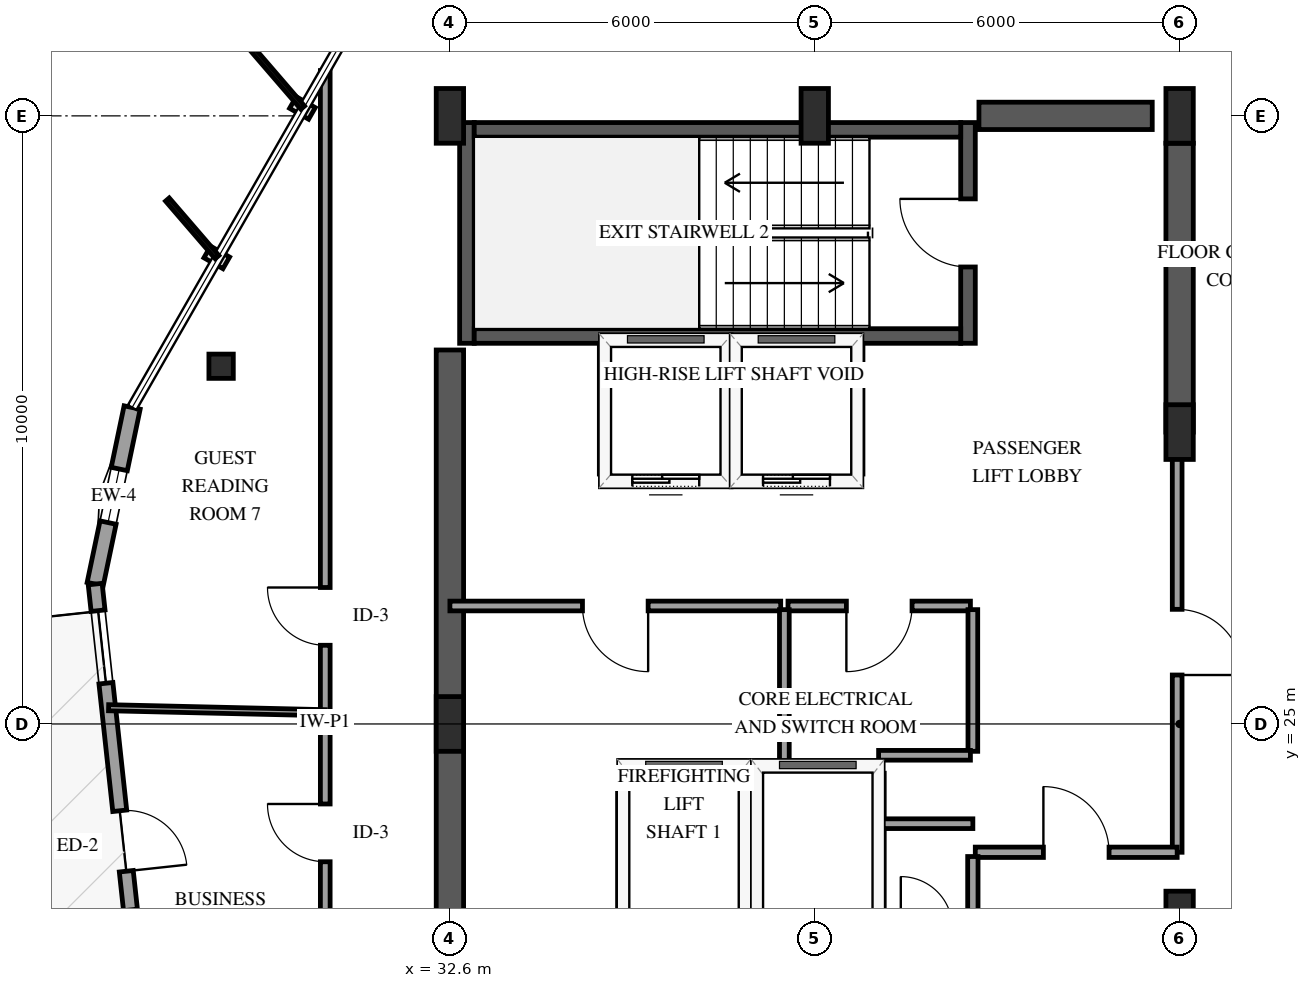
"""IFC4 building model, lengths in metres.
Left out: names, types, materials, properties, quantities, classifications, styles, units other than length and angle.
Written with IfcOpenShell. Run it as: python <this file> out.ifc"""

import sys

from ifc_helpers import new_model, si_unit, direction, frame, frame_2d, origin, origin_2d, place, context, subcontext, project, spatial, rectangle, i_section, extrude, element, fill, save


model = new_model("IFC4")
c1 = context("Model", 3, precision=1e-05, world=origin(), true_north=direction((0.0, 1.0)))
c2 = subcontext(c1, "Body", "Model", "MODEL_VIEW")
j1 = project(units=[si_unit("LENGTHUNIT", "METRE"), si_unit("PLANEANGLEUNIT", "RADIAN")], contexts=[c1])
p1 = place(None, origin())
s1 = spatial("IfcSite", under=j1, at=p1, CompositionType="ELEMENT")
p2 = place(p1, origin())
s2 = spatial("IfcBuilding", under=s1, at=p2, CompositionType="ELEMENT")
p3 = place(p2, frame((0.0, 0.0, 253.75)))
s3 = spatial("IfcBuildingStorey", under=s2, at=p3, CompositionType="ELEMENT", Elevation=253.75)
p4 = place(p3, frame((32.88, 31.26, 0.0), z_axis=(0.0, 0.0, 1.0), x_axis=(0.0, 1.0, 0.0)))
e1 = element("IfcWall", 1, at=p4, inside=s3, PredefinedType="SHEAR", context=c2, shape_type="SweptSolid", body=[
    extrude(rectangle(XDim=3.63, YDim=0.24, at=frame_2d((1.815, 0.0))), origin(), (0.0, 0.0, 1.0), 3.75),
])
p5 = place(p3, frame((41.12, 31.26, 0.0), z_axis=(0.0, 0.0, 1.0), x_axis=(0.0, 1.0, 0.0)))
e2 = element("IfcWall", 2, at=p5, inside=s3, PredefinedType="SHEAR", context=c2, shape_type="SweptSolid", body=[
    extrude(rectangle(XDim=3.63, YDim=0.24, at=frame_2d((1.815, 0.0))), origin(), (0.0, 0.0, 1.0), 3.75),
])
p6 = place(p5, frame((1.255, 0.0, 0.0)))
e3 = element("IfcOpeningElement", 3, at=p6, cuts=e2, PredefinedType="OPENING", context=c2, shape_type="SweptSolid", body=[
    extrude(rectangle(XDim=1.12, YDim=2.15, at=frame_2d((0.56, 1.075))), frame((0.0, 0.13, 0.0), z_axis=(0.0, -1.0, 0.0), x_axis=(1.0, 0.0, 0.0)), (0.0, 0.0, 1.0), 0.26),
])
for number, where, z_axis, x_axis in (
    (4, (33.0, 31.38, 0.0), (0.0, 0.0, 1.0), (1.0, 0.0, 0.0)),
    (5, (33.0, 34.77, 0.0), (0.0, 0.0, 1.0), (1.0, 0.0, 0.0)),
):
    element("IfcWall", number, at=place(p3, frame(where, z_axis=z_axis, x_axis=x_axis)), inside=s3, PredefinedType="SHEAR", context=c2, shape_type="SweptSolid", body=[
        extrude(rectangle(XDim=8.0, YDim=0.24, at=frame_2d((4.0, 0.0))), origin(), (0.0, 0.0, 1.0), 3.75),
    ])
p7 = place(p3, frame((32.6, 18.85, 0.0), z_axis=(0.0, 0.0, 1.0), x_axis=(0.0, 1.0, 0.0)))
e6 = element("IfcWall", 6, at=p7, inside=s3, PredefinedType="SHEAR", context=c2, shape_type="SweptSolid", body=[
    extrude(rectangle(XDim=12.3, YDim=0.45, at=frame_2d((6.15, 0.0))), origin(), (0.0, 0.0, 1.0), 3.75),
])
p8 = place(p3, frame((41.3, 35.0, 0.0), z_axis=(0.0, 0.0, 1.0), x_axis=(1.0, 0.0, 0.0)))
e7 = element("IfcWall", 7, at=p8, inside=s3, PredefinedType="SHEAR", context=c2, shape_type="SweptSolid", body=[
    extrude(rectangle(XDim=2.85, YDim=0.45, at=frame_2d((1.425, 0.0))), origin(), (0.0, 0.0, 1.0), 3.75),
])
p9 = place(p3, frame((44.6, 29.8, 0.0), z_axis=(0.0, 0.0, 1.0), x_axis=(0.0, 1.0, 0.0)))
e8 = element("IfcWall", 8, at=p9, inside=s3, PredefinedType="SHEAR", context=c2, shape_type="SweptSolid", body=[
    extrude(rectangle(XDim=4.75, YDim=0.45, at=frame_2d((2.375, 0.0))), origin(), (0.0, 0.0, 1.0), 3.75),
])
for number, where, z_axis, x_axis in (
    (9, (32.6, 25.0, 0.0), (0.0, 0.0, 1.0), (1.0, 0.0, 0.0)),
    (10, (32.6, 35.0, 0.0), (0.0, 0.0, 1.0), (1.0, 0.0, 0.0)),
    (11, (38.6, 35.0, 0.0), (0.0, 0.0, 1.0), (1.0, 0.0, 0.0)),
    (12, (44.6, 21.8, 0.0), (0.0, 0.0, 1.0), (1.0, 0.0, 0.0)),
    (13, (44.6, 29.8, 0.0), (0.0, 0.0, 1.0), (1.0, 0.0, 0.0)),
    (14, (44.6, 35.0, 0.0), (0.0, 0.0, 1.0), (1.0, 0.0, 0.0)),
):
    element("IfcColumn", number, at=place(p3, frame(where, z_axis=z_axis, x_axis=x_axis)), inside=s3, PredefinedType="PILASTER", context=c2, shape_type="SweptSolid", body=[
        extrude(rectangle(XDim=0.45, YDim=0.9, at=origin_2d()), origin(), (0.0, 0.0, 1.0), 3.75),
    ])
p10 = place(p3, frame((28.837, 30.883, 0.0), z_axis=(0.0, 0.0, 1.0), x_axis=(1.0, 0.0, 0.0)))
e15 = element("IfcColumn", 15, at=p10, inside=s3, PredefinedType="COLUMN", context=c2, shape_type="SweptSolid", body=[
    extrude(i_section(OverallWidth=0.401, OverallDepth=0.399, WebThickness=0.025, FlangeThickness=0.04, FilletRadius=0.038, at=origin_2d()), origin(), (0.0, 0.0, 1.0), 3.75),
])
p11 = place(p3, frame((27.374, 30.204, 0.0), z_axis=(0.0, 0.0, 1.0), x_axis=(-0.204828317867, -0.978797915915, 0.0)))
e16 = element("IfcWall", 16, at=p11, inside=s3, PredefinedType="SOLIDWALL", context=c2, shape_type="SweptSolid", body=[
    extrude(rectangle(XDim=2.967, YDim=0.27, at=frame_2d((1.483, 0.0))), origin(), (0.0, 0.0, 1.0), 2.829),
])
p12 = place(p11, frame((1.033, 0.0, 0.75)))
e17 = element("IfcOpeningElement", 17, at=p12, cuts=e16, PredefinedType="OPENING", context=c2, shape_type="SweptSolid", body=[
    extrude(rectangle(XDim=0.9, YDim=1.5, at=frame_2d((0.45, 0.75))), frame((0.0, 0.145, 0.0), z_axis=(0.0, -1.0, 0.0), x_axis=(1.0, 0.0, 0.0)), (0.0, 0.0, 1.0), 0.29),
])
p13 = place(p3, frame((26.767, 27.3, 0.0), z_axis=(0.0, 0.0, 1.0), x_axis=(0.107656797247, -0.994188118017, 0.0)))
e18 = element("IfcWall", 18, at=p13, inside=s3, PredefinedType="SOLIDWALL", context=c2, shape_type="SweptSolid", body=[
    extrude(rectangle(XDim=8.5, YDim=0.23, at=frame_2d((4.25, 0.0))), origin(), (0.0, 0.0, 1.0), 2.829),
])
p14 = place(p13, frame((3.75, 0.0, 0.0)))
e19 = element("IfcOpeningElement", 19, at=p14, cuts=e18, PredefinedType="OPENING", context=c2, shape_type="SweptSolid", body=[
    extrude(rectangle(XDim=1.0, YDim=2.15, at=frame_2d((0.5, 1.075))), frame((0.0, 0.125, 0.0), z_axis=(0.0, -1.0, 0.0), x_axis=(1.0, 0.0, 0.0)), (0.0, 0.0, 1.0), 0.25),
])
p15 = place(p13, frame((0.44, 0.0, 0.72)))
e20 = element("IfcOpeningElement", 20, at=p15, cuts=e18, PredefinedType="OPENING", context=c2, shape_type="SweptSolid", body=[
    extrude(rectangle(XDim=1.2, YDim=1.6, at=frame_2d((0.6, 0.8))), frame((0.0, 0.125, 0.0), z_axis=(0.0, -1.0, 0.0), x_axis=(1.0, 0.0, 0.0)), (0.0, 0.0, 1.0), 0.25),
])
p16 = place(p13, frame((5.39, 0.0, 0.72)))
e21 = element("IfcOpeningElement", 21, at=p16, cuts=e18, PredefinedType="OPENING", context=c2, shape_type="SweptSolid", body=[
    extrude(rectangle(XDim=1.2, YDim=1.6, at=frame_2d((0.6, 0.8))), frame((0.0, 0.125, 0.0), z_axis=(0.0, -1.0, 0.0), x_axis=(1.0, 0.0, 0.0)), (0.0, 0.0, 1.0), 0.25),
])
p17 = place(p3, frame((35.45, 24.3, 0.0), z_axis=(0.0, 0.0, 1.0), x_axis=(1.0, 0.0, 0.0)))
e22 = element("IfcWall", 22, at=p17, inside=s3, PredefinedType="SOLIDWALL", context=c2, shape_type="SweptSolid", body=[
    extrude(rectangle(XDim=2.0, YDim=0.185, at=frame_2d((1.0, 0.0))), origin(), (0.0, 0.0, 1.0), 2.824),
])
for number, where, z_axis, x_axis in (
    (23, (35.45, 21.81, 0.0), (0.0, 0.0, 1.0), (0.0, 1.0, 0.0)),
    (24, (37.45, 21.81, 0.0), (0.0, 0.0, 1.0), (0.0, 1.0, 0.0)),
):
    element("IfcWall", number, at=place(p3, frame(where, z_axis=z_axis, x_axis=x_axis)), inside=s3, PredefinedType="SOLIDWALL", context=c2, shape_type="SweptSolid", body=[
        extrude(rectangle(XDim=2.38, YDim=0.185, at=frame_2d((1.19, 0.0))), origin(), (0.0, 0.0, 1.0), 3.45),
    ])
p18 = place(p3, frame((37.65, 24.3, 0.0), z_axis=(0.0, 0.0, 1.0), x_axis=(1.0, 0.0, 0.0)))
e25 = element("IfcWall", 25, at=p18, inside=s3, PredefinedType="SOLIDWALL", context=c2, shape_type="SweptSolid", body=[
    extrude(rectangle(XDim=2.0, YDim=0.185, at=frame_2d((1.0, 0.0))), origin(), (0.0, 0.0, 1.0), 2.824),
])
p19 = place(p3, frame((39.65, 21.81, 0.0), z_axis=(0.0, 0.0, 1.0), x_axis=(0.0, 1.0, 0.0)))
e26 = element("IfcWall", 26, at=p19, inside=s3, PredefinedType="SOLIDWALL", context=c2, shape_type="SweptSolid", body=[
    extrude(rectangle(XDim=2.38, YDim=0.185, at=frame_2d((1.19, 0.0))), origin(), (0.0, 0.0, 1.0), 3.45),
])
p20 = place(p3, frame((35.15, 29.0, 0.0), z_axis=(0.0, 0.0, 1.0), x_axis=(1.0, 0.0, 0.0)))
e27 = element("IfcWall", 27, at=p20, inside=s3, PredefinedType="SOLIDWALL", context=c2, shape_type="SweptSolid", body=[
    extrude(rectangle(XDim=2.0, YDim=0.185, at=frame_2d((1.0, 0.0))), origin(), (0.0, 0.0, 1.0), 3.45),
])
p21 = place(p20, frame((0.45, 0.0, 0.0)))
e28 = element("IfcOpeningElement", 28, at=p21, cuts=e27, PredefinedType="OPENING", context=c2, shape_type="SweptSolid", body=[
    extrude(rectangle(XDim=1.1, YDim=2.15, at=frame_2d((0.55, 1.075))), frame((0.0, 0.103, 0.0), z_axis=(0.0, -1.0, 0.0), x_axis=(1.0, 0.0, 0.0)), (0.0, 0.0, 1.0), 0.205),
])
for number, where, z_axis, x_axis in (
    (29, (35.15, 29.11, 0.0), (0.0, 0.0, 1.0), (0.0, 1.0, 0.0)),
    (30, (37.15, 29.11, 0.0), (0.0, 0.0, 1.0), (0.0, 1.0, 0.0)),
):
    element("IfcWall", number, at=place(p3, frame(where, z_axis=z_axis, x_axis=x_axis)), inside=s3, PredefinedType="SOLIDWALL", context=c2, shape_type="SweptSolid", body=[
        extrude(rectangle(XDim=2.1, YDim=0.185, at=frame_2d((1.05, 0.0))), origin(), (0.0, 0.0, 1.0), 3.45),
    ])
p22 = place(p3, frame((37.3, 29.0, 0.0), z_axis=(0.0, 0.0, 1.0), x_axis=(1.0, 0.0, 0.0)))
e31 = element("IfcWall", 31, at=p22, inside=s3, PredefinedType="SOLIDWALL", context=c2, shape_type="SweptSolid", body=[
    extrude(rectangle(XDim=2.0, YDim=0.185, at=frame_2d((1.0, 0.0))), origin(), (0.0, 0.0, 1.0), 3.45),
])
p23 = place(p22, frame((0.45, 0.0, 0.0)))
e32 = element("IfcOpeningElement", 32, at=p23, cuts=e31, PredefinedType="OPENING", context=c2, shape_type="SweptSolid", body=[
    extrude(rectangle(XDim=1.1, YDim=2.15, at=frame_2d((0.55, 1.075))), frame((0.0, 0.103, 0.0), z_axis=(0.0, -1.0, 0.0), x_axis=(1.0, 0.0, 0.0)), (0.0, 0.0, 1.0), 0.205),
])
p24 = place(p3, frame((39.3, 29.11, 0.0), z_axis=(0.0, 0.0, 1.0), x_axis=(0.0, 1.0, 0.0)))
e33 = element("IfcWall", 33, at=p24, inside=s3, PredefinedType="SOLIDWALL", context=c2, shape_type="SweptSolid", body=[
    extrude(rectangle(XDim=2.1, YDim=0.185, at=frame_2d((1.05, 0.0))), origin(), (0.0, 0.0, 1.0), 3.45),
])
p25 = place(p3, frame((30.55, 25.185, 0.0), z_axis=(0.0, 0.0, 1.0), x_axis=(0.0, 1.0, 0.0)))
e34 = element("IfcWall", 34, at=p25, inside=s3, PredefinedType="PARTITIONING", context=c2, shape_type="SweptSolid", body=[
    extrude(rectangle(XDim=10.56, YDim=0.16, at=frame_2d((5.28, 0.0))), origin(), (0.0, 0.0, 1.0), 3.45),
])
p26 = place(p25, frame((1.109, 0.0, 0.0)))
e35 = element("IfcOpeningElement", 35, at=p26, cuts=e34, PredefinedType="OPENING", context=c2, shape_type="SweptSolid", body=[
    extrude(rectangle(XDim=0.95, YDim=2.15, at=frame_2d((0.475, 1.075))), frame((0.0, 0.09, 0.0), z_axis=(0.0, -1.0, 0.0), x_axis=(1.0, 0.0, 0.0)), (0.0, 0.0, 1.0), 0.18),
])
p27 = place(p3, frame((44.56, 29.8, 0.0), z_axis=(0.0, 0.0, 1.0), x_axis=(0.0, -1.0, 0.0)))
e36 = element("IfcWall", 36, at=p27, inside=s3, PredefinedType="PARTITIONING", context=c2, shape_type="SweptSolid", body=[
    extrude(rectangle(XDim=6.91, YDim=0.16, at=frame_2d((3.455, 0.0))), origin(), (0.0, 0.0, 1.0), 2.49),
])
p28 = place(p27, frame((2.915, 0.0, 0.0)))
e37 = element("IfcOpeningElement", 37, at=p28, cuts=e36, PredefinedType="OPENING", context=c2, shape_type="SweptSolid", body=[
    extrude(rectangle(XDim=1.08, YDim=2.15, at=frame_2d((0.54, 1.075))), frame((0.0, 0.09, 0.0), z_axis=(0.0, -1.0, 0.0), x_axis=(1.0, 0.0, 0.0)), (0.0, 0.0, 1.0), 0.18),
])
p29 = place(p3, frame((38.04, 26.94, 0.0), z_axis=(0.0, 0.0, 1.0), x_axis=(-1.0, 0.0, 0.0)))
e38 = element("IfcWall", 38, at=p29, inside=s3, PredefinedType="PARTITIONING", context=c2, shape_type="SweptSolid", body=[
    extrude(rectangle(XDim=5.44, YDim=0.16, at=frame_2d((2.72, 0.0))), origin(), (0.0, 0.0, 1.0), 3.45),
])
p30 = place(p29, frame((2.18, 0.0, 0.0)))
e39 = element("IfcOpeningElement", 39, at=p30, cuts=e38, PredefinedType="OPENING", context=c2, shape_type="SweptSolid", body=[
    extrude(rectangle(XDim=1.08, YDim=2.15, at=frame_2d((0.54, 1.075))), frame((0.0, 0.09, 0.0), z_axis=(0.0, -1.0, 0.0), x_axis=(1.0, 0.0, 0.0)), (0.0, 0.0, 1.0), 0.18),
])
p31 = place(p3, frame((30.55, 21.234, 0.0), z_axis=(0.0, 0.0, 1.0), x_axis=(0.0, 1.0, 0.0)))
e40 = element("IfcWall", 40, at=p31, inside=s3, PredefinedType="PARTITIONING", context=c2, shape_type="SweptSolid", body=[
    extrude(rectangle(XDim=3.951, YDim=0.16, at=frame_2d((1.976, 0.0))), origin(), (0.0, 0.0, 1.0), 3.45),
])
p32 = place(p31, frame((1.5, 0.0, 0.0)))
e41 = element("IfcOpeningElement", 41, at=p32, cuts=e40, PredefinedType="OPENING", context=c2, shape_type="SweptSolid", body=[
    extrude(rectangle(XDim=0.95, YDim=2.15, at=frame_2d((0.475, 1.075))), frame((0.0, 0.09, 0.0), z_axis=(0.0, -1.0, 0.0), x_axis=(1.0, 0.0, 0.0)), (0.0, 0.0, 1.0), 0.18),
])
p33 = place(p3, frame((30.55, 25.185, 0.0), z_axis=(0.0, 0.0, 1.0), x_axis=(-0.999735072364, 0.023017060731, 0.0)))
e42 = element("IfcWall", 42, at=p33, inside=s3, PredefinedType="PARTITIONING", context=c2, shape_type="SweptSolid", body=[
    extrude(rectangle(XDim=3.564, YDim=0.1, at=frame_2d((1.782, 0.0))), origin(), (0.0, 0.0, 1.0), 3.45),
])
p34 = place(p3, frame((41.24, 22.89, 0.0), z_axis=(0.0, 0.0, 1.0), x_axis=(1.0, 0.0, 0.0)))
e43 = element("IfcWall", 43, at=p34, inside=s3, PredefinedType="PARTITIONING", context=c2, shape_type="SweptSolid", body=[
    extrude(rectangle(XDim=3.32, YDim=0.17, at=frame_2d((1.66, 0.0))), origin(), (0.0, 0.0, 1.0), 3.45),
])
p35 = place(p34, frame((1.12, 0.0, 0.0)))
e44 = element("IfcOpeningElement", 44, at=p35, cuts=e43, PredefinedType="OPENING", context=c2, shape_type="SweptSolid", body=[
    extrude(rectangle(XDim=1.08, YDim=2.15, at=frame_2d((0.54, 1.075))), frame((0.0, 0.095, 0.0), z_axis=(0.0, -1.0, 0.0), x_axis=(1.0, 0.0, 0.0)), (0.0, 0.0, 1.0), 0.19),
])
p36 = place(p3, frame((41.16, 26.94, 0.0), z_axis=(0.0, 0.0, 1.0), x_axis=(-1.0, 0.0, 0.0)))
e45 = element("IfcWall", 45, at=p36, inside=s3, PredefinedType="PARTITIONING", context=c2, shape_type="SweptSolid", body=[
    extrude(rectangle(XDim=3.0, YDim=0.16, at=frame_2d((1.5, 0.0))), origin(), (0.0, 0.0, 1.0), 3.45),
])
p37 = place(p36, frame((0.96, 0.0, 0.0)))
e46 = element("IfcOpeningElement", 46, at=p37, cuts=e45, PredefinedType="OPENING", context=c2, shape_type="SweptSolid", body=[
    extrude(rectangle(XDim=1.08, YDim=2.15, at=frame_2d((0.54, 1.075))), frame((0.0, 0.09, 0.0), z_axis=(0.0, -1.0, 0.0), x_axis=(1.0, 0.0, 0.0)), (0.0, 0.0, 1.0), 0.18),
])
p38 = place(p3, frame((38.1, 26.88, 0.0), z_axis=(0.0, 0.0, 1.0), x_axis=(0.0, -1.0, 0.0)))
e47 = element("IfcWall", 47, at=p38, inside=s3, PredefinedType="PARTITIONING", context=c2, shape_type="SweptSolid", body=[
    extrude(rectangle(XDim=2.58, YDim=0.16, at=frame_2d((1.29, 0.0))), origin(), (0.0, 0.0, 1.0), 3.45),
])
p39 = place(p3, frame((41.2, 24.55, 0.0), z_axis=(0.0, 0.0, 1.0), x_axis=(0.0, 1.0, 0.0)))
e48 = element("IfcWall", 48, at=p39, inside=s3, PredefinedType="PARTITIONING", context=c2, shape_type="SweptSolid", body=[
    extrude(rectangle(XDim=2.33, YDim=0.16, at=frame_2d((1.165, 0.0))), origin(), (0.0, 0.0, 1.0), 3.45),
])
p40 = place(p3, frame((39.65, 24.485, 0.0), z_axis=(0.0, 0.0, 1.0), x_axis=(1.0, 0.0, 0.0)))
e49 = element("IfcWall", 49, at=p40, inside=s3, PredefinedType="PARTITIONING", context=c2, shape_type="SweptSolid", body=[
    extrude(rectangle(XDim=1.51, YDim=0.16, at=frame_2d((0.755, 0.0))), origin(), (0.0, 0.0, 1.0), 2.824),
])
p41 = place(p3, frame((41.2, 21.7, 0.0), z_axis=(0.0, 0.0, 1.0), x_axis=(0.0, 1.0, 0.0)))
e50 = element("IfcWall", 50, at=p41, inside=s3, PredefinedType="PARTITIONING", context=c2, shape_type="SweptSolid", body=[
    extrude(rectangle(XDim=1.12, YDim=0.17, at=frame_2d((0.56, 0.0))), origin(), (0.0, 0.0, 1.0), 3.45),
])
p42 = place(p3, frame((41.2, 23.36, 0.0), z_axis=(0.0, 0.0, 1.0), x_axis=(-1.0, 0.0, 0.0)))
e51 = element("IfcWall", 51, at=p42, inside=s3, PredefinedType="PARTITIONING", context=c2, shape_type="SweptSolid", body=[
    extrude(rectangle(XDim=1.48, YDim=0.16, at=frame_2d((0.74, 0.0))), origin(), (0.0, 0.0, 1.0), 3.45),
])
p43 = place(p12, origin())
e52 = element("IfcWindow", 52, at=p43, inside=s3, PartitioningType="SINGLE_PANEL", PredefinedType="WINDOW", context=c2, shape_type="SweptSolid", body=[
    extrude(rectangle(XDim=0.9, YDim=1.5, at=frame_2d((0.45, 0.75))), frame((0.0, 0.03, 0.0), z_axis=(0.0, -1.0, 0.0), x_axis=(1.0, 0.0, 0.0)), (0.0, 0.0, 1.0), 0.06),
])
fill(e17, e52)
p44 = place(p14, origin())
e53 = element("IfcDoor", 53, at=p44, inside=s3, OperationType="SINGLE_SWING_RIGHT", PredefinedType="DOOR", context=c2, shape_type="SweptSolid", body=[
    extrude(rectangle(XDim=1.0, YDim=2.15, at=frame_2d((0.5, 1.075))), frame((0.0, 0.025, 0.0), z_axis=(0.0, -1.0, 0.0), x_axis=(1.0, 0.0, 0.0)), (0.0, 0.0, 1.0), 0.05),
])
fill(e19, e53)
p45 = place(p15, origin())
e54 = element("IfcWindow", 54, at=p45, inside=s3, PartitioningType="SINGLE_PANEL", PredefinedType="WINDOW", context=c2, shape_type="SweptSolid", body=[
    extrude(rectangle(XDim=1.2, YDim=1.6, at=frame_2d((0.6, 0.8))), frame((0.0, 0.03, 0.0), z_axis=(0.0, -1.0, 0.0), x_axis=(1.0, 0.0, 0.0)), (0.0, 0.0, 1.0), 0.06),
])
fill(e20, e54)
p46 = place(p21, origin())
e55 = element("IfcDoor", 55, at=p46, inside=s3, OperationType="SLIDING_TO_LEFT", PredefinedType="DOOR", context=c2, shape_type="SweptSolid", body=[
    extrude(rectangle(XDim=1.1, YDim=2.15, at=frame_2d((0.55, 1.075))), frame((0.0, 0.025, 0.0), z_axis=(0.0, -1.0, 0.0), x_axis=(1.0, 0.0, 0.0)), (0.0, 0.0, 1.0), 0.05),
])
fill(e28, e55)
p47 = place(p23, origin())
e56 = element("IfcDoor", 56, at=p47, inside=s3, OperationType="SLIDING_TO_LEFT", PredefinedType="DOOR", context=c2, shape_type="SweptSolid", body=[
    extrude(rectangle(XDim=1.1, YDim=2.15, at=frame_2d((0.55, 1.075))), frame((0.0, 0.025, 0.0), z_axis=(0.0, -1.0, 0.0), x_axis=(1.0, 0.0, 0.0)), (0.0, 0.0, 1.0), 0.05),
])
fill(e32, e56)
p48 = place(p6, origin())
e57 = element("IfcDoor", 57, at=p48, inside=s3, OperationType="SINGLE_SWING_RIGHT", PredefinedType="DOOR", context=c2, shape_type="SweptSolid", body=[
    extrude(rectangle(XDim=1.12, YDim=2.15, at=frame_2d((0.56, 1.075))), frame((0.0, 0.025, 0.0), z_axis=(0.0, -1.0, 0.0), x_axis=(1.0, 0.0, 0.0)), (0.0, 0.0, 1.0), 0.05),
])
fill(e3, e57)
p49 = place(p26, origin())
e58 = element("IfcDoor", 58, at=p49, inside=s3, OperationType="SINGLE_SWING_RIGHT", PredefinedType="DOOR", context=c2, shape_type="SweptSolid", body=[
    extrude(rectangle(XDim=0.95, YDim=2.15, at=frame_2d((0.475, 1.075))), frame((0.0, 0.025, 0.0), z_axis=(0.0, -1.0, 0.0), x_axis=(1.0, 0.0, 0.0)), (0.0, 0.0, 1.0), 0.05),
])
fill(e35, e58)
p50 = place(p28, origin())
e59 = element("IfcDoor", 59, at=p50, inside=s3, OperationType="SINGLE_SWING_RIGHT", PredefinedType="DOOR", context=c2, shape_type="SweptSolid", body=[
    extrude(rectangle(XDim=1.08, YDim=2.15, at=frame_2d((0.54, 1.075))), frame((0.0, 0.025, 0.0), z_axis=(0.0, -1.0, 0.0), x_axis=(1.0, 0.0, 0.0)), (0.0, 0.0, 1.0), 0.05),
])
fill(e37, e59)
p51 = place(p30, origin())
e60 = element("IfcDoor", 60, at=p51, inside=s3, OperationType="SINGLE_SWING_LEFT", PredefinedType="DOOR", context=c2, shape_type="SweptSolid", body=[
    extrude(rectangle(XDim=1.08, YDim=2.15, at=frame_2d((0.54, 1.075))), frame((0.0, 0.025, 0.0), z_axis=(0.0, -1.0, 0.0), x_axis=(1.0, 0.0, 0.0)), (0.0, 0.0, 1.0), 0.05),
])
fill(e39, e60)
p52 = place(p32, origin())
e61 = element("IfcDoor", 61, at=p52, inside=s3, OperationType="SINGLE_SWING_RIGHT", PredefinedType="DOOR", context=c2, shape_type="SweptSolid", body=[
    extrude(rectangle(XDim=0.95, YDim=2.15, at=frame_2d((0.475, 1.075))), frame((0.0, 0.025, 0.0), z_axis=(0.0, -1.0, 0.0), x_axis=(1.0, 0.0, 0.0)), (0.0, 0.0, 1.0), 0.05),
])
fill(e41, e61)
p53 = place(p35, origin())
e62 = element("IfcDoor", 62, at=p53, inside=s3, OperationType="SINGLE_SWING_LEFT", PredefinedType="DOOR", context=c2, shape_type="SweptSolid", body=[
    extrude(rectangle(XDim=1.08, YDim=2.15, at=frame_2d((0.54, 1.075))), frame((0.0, 0.025, 0.0), z_axis=(0.0, -1.0, 0.0), x_axis=(1.0, 0.0, 0.0)), (0.0, 0.0, 1.0), 0.05),
])
fill(e44, e62)
p54 = place(p37, origin())
e63 = element("IfcDoor", 63, at=p54, inside=s3, OperationType="SINGLE_SWING_RIGHT", PredefinedType="DOOR", context=c2, shape_type="SweptSolid", body=[
    extrude(rectangle(XDim=1.08, YDim=2.15, at=frame_2d((0.54, 1.075))), frame((0.0, 0.025, 0.0), z_axis=(0.0, -1.0, 0.0), x_axis=(1.0, 0.0, 0.0)), (0.0, 0.0, 1.0), 0.05),
])
fill(e46, e63)
save(model, sys.argv[1])
